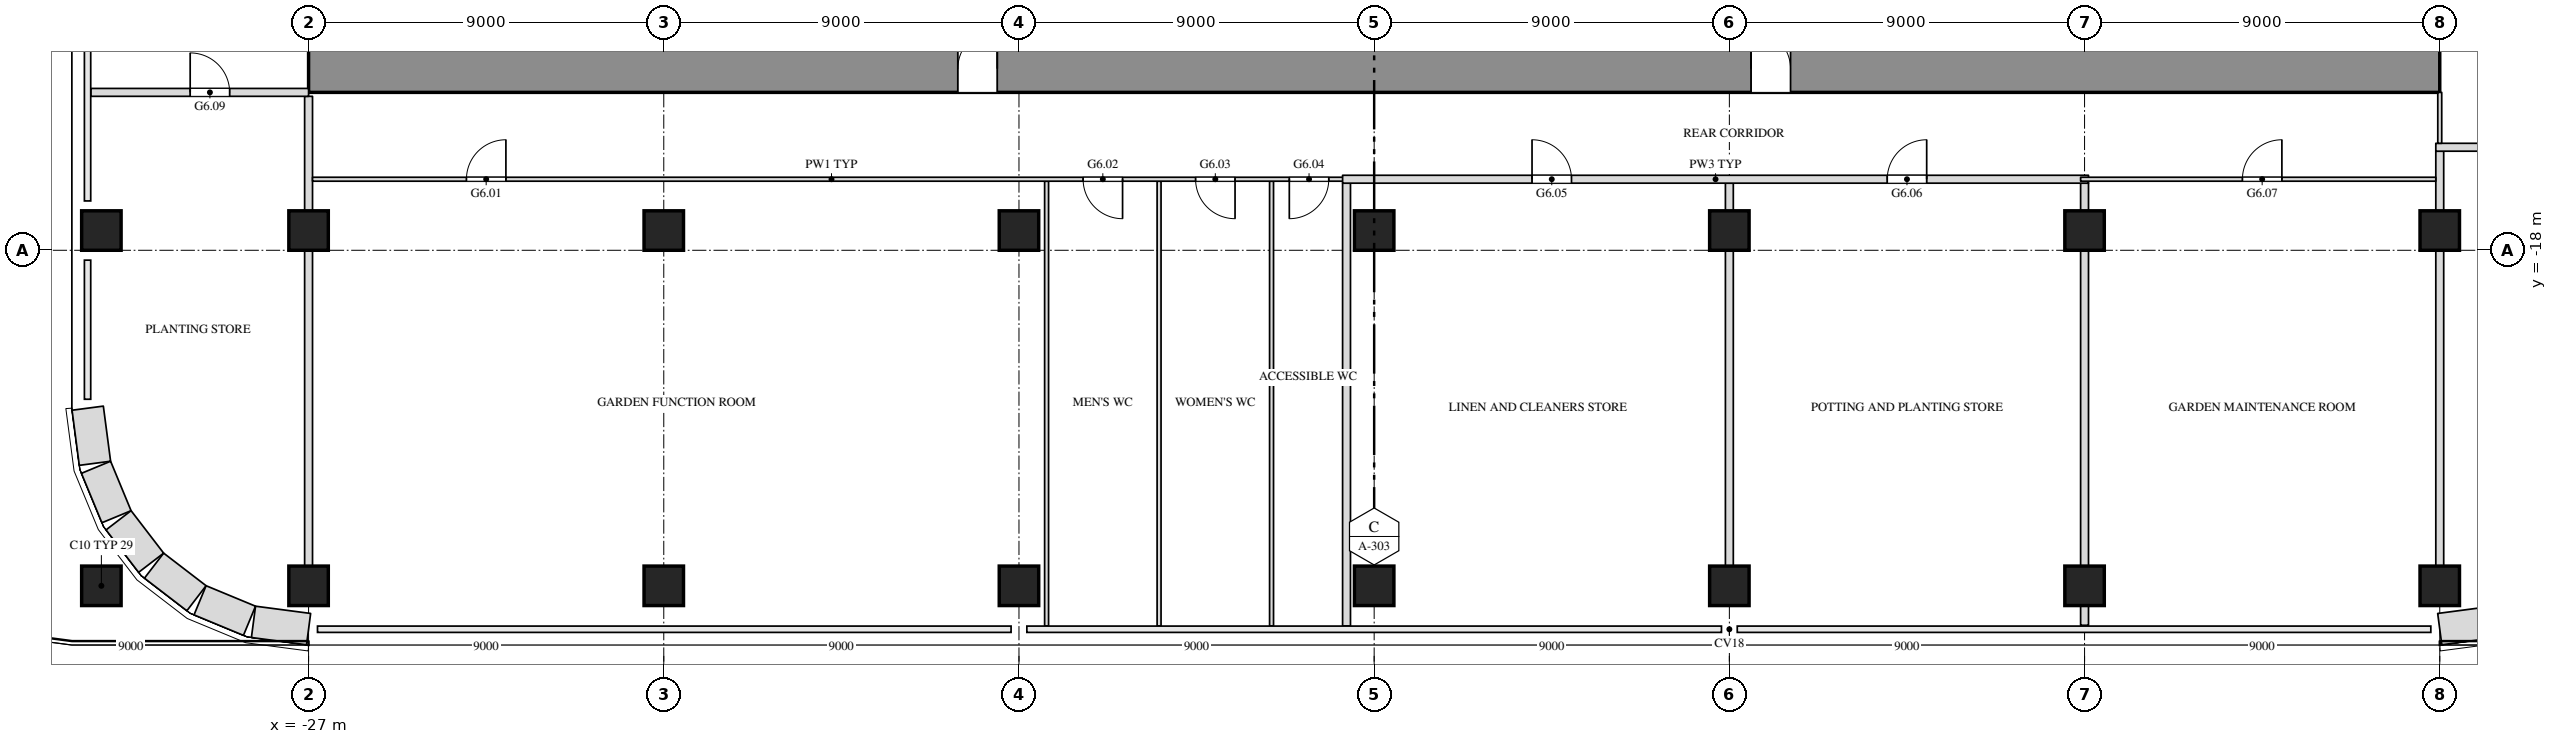
"""IFC4 building model, lengths in metres.
Left out: names, types, materials, properties, quantities, classifications, styles, units other than length and angle.
Written with IfcOpenShell. Run it as: python <this file> out.ifc"""

import sys

from ifc_helpers import new_model, si_unit, direction, frame, frame_2d, origin, origin_2d, place, context, subcontext, project, spatial, rectangle, extrude, element, fill, save


model = new_model("IFC4")
c1 = context("Model", 3, precision=1e-05, world=origin(), true_north=direction((0.0, 1.0)))
c2 = subcontext(c1, "Body", "Model", "MODEL_VIEW")
j1 = project(units=[si_unit("LENGTHUNIT", "METRE"), si_unit("PLANEANGLEUNIT", "RADIAN")], contexts=[c1])
p1 = place(None, origin())
s1 = spatial("IfcSite", under=j1, at=p1, CompositionType="ELEMENT")
p2 = place(p1, origin())
s2 = spatial("IfcBuilding", under=s1, at=p2, CompositionType="ELEMENT")
p3 = place(p2, frame((0.0, 0.0, 39.0)))
s3 = spatial("IfcBuildingStorey", under=s2, at=p3, CompositionType="ELEMENT", Elevation=39.0)
for number, where, z_axis, x_axis in (
    (1, (-32.25, -26.5, 0.0), (0.0, 0.0, 1.0), (1.0, 0.0, 0.0)),
    (2, (-27.0, -26.5, 0.0), (0.0, 0.0, 1.0), (1.0, 0.0, 0.0)),
    (3, (-18.0, -26.5, 0.0), (0.0, 0.0, 1.0), (1.0, 0.0, 0.0)),
    (4, (-9.0, -26.5, 0.0), (0.0, 0.0, 1.0), (1.0, 0.0, 0.0)),
    (5, (0.0, -26.5, 0.0), (0.0, 0.0, 1.0), (1.0, 0.0, 0.0)),
    (6, (9.0, -26.5, 0.0), (0.0, 0.0, 1.0), (1.0, 0.0, 0.0)),
    (7, (18.0, -26.5, 0.0), (0.0, 0.0, 1.0), (1.0, 0.0, 0.0)),
    (8, (27.0, -26.5, 0.0), (0.0, 0.0, 1.0), (1.0, 0.0, 0.0)),
    (9, (-32.25, -17.5, 0.0), (0.0, 0.0, 1.0), (1.0, 0.0, 0.0)),
    (10, (-27.0, -17.5, 0.0), (0.0, 0.0, 1.0), (1.0, 0.0, 0.0)),
    (11, (-18.0, -17.5, 0.0), (0.0, 0.0, 1.0), (1.0, 0.0, 0.0)),
    (12, (-9.0, -17.5, 0.0), (0.0, 0.0, 1.0), (1.0, 0.0, 0.0)),
    (13, (0.0, -17.5, 0.0), (0.0, 0.0, 1.0), (1.0, 0.0, 0.0)),
    (14, (9.0, -17.5, 0.0), (0.0, 0.0, 1.0), (1.0, 0.0, 0.0)),
    (15, (18.0, -17.5, 0.0), (0.0, 0.0, 1.0), (1.0, 0.0, 0.0)),
    (16, (27.0, -17.5, 0.0), (0.0, 0.0, 1.0), (1.0, 0.0, 0.0)),
):
    element("IfcColumn", number, at=place(p3, frame(where, z_axis=z_axis, x_axis=x_axis)), inside=s3, PredefinedType="COLUMN", context=c2, shape_type="SweptSolid", body=[
        extrude(rectangle(XDim=1.0, YDim=1.0, at=origin_2d()), origin(), (0.0, 0.0, 1.0), 4.5),
    ])
p4 = place(p3, frame((-27.0, -13.4, 0.0), z_axis=(0.0, 0.0, 1.0), x_axis=(1.0, 0.0, 0.0)))
e17 = element("IfcWall", 17, at=p4, inside=s3, PredefinedType="SHEAR", context=c2, shape_type="SweptSolid", body=[
    extrude(rectangle(XDim=54.0, YDim=1.2, at=frame_2d((27.0, 0.0))), origin(), (0.0, 0.0, 1.0), 4.25),
])
p5 = place(p4, frame((16.45, 0.0, 0.0)))
e18 = element("IfcOpeningElement", 18, at=p5, cuts=e17, PredefinedType="OPENING", context=c2, shape_type="SweptSolid", body=[
    extrude(rectangle(XDim=1.0, YDim=2.1, at=frame_2d((0.5, 1.05))), frame((0.0, 0.612, 0.0), z_axis=(0.0, -1.0, 0.0), x_axis=(1.0, 0.0, 0.0)), (0.0, 0.0, 1.0), 1.224),
])
p6 = place(p4, frame((36.55, 0.0, 0.0)))
e19 = element("IfcOpeningElement", 19, at=p6, cuts=e17, PredefinedType="OPENING", context=c2, shape_type="SweptSolid", body=[
    extrude(rectangle(XDim=1.0, YDim=2.1, at=frame_2d((0.5, 1.05))), frame((0.0, 0.612, 0.0), z_axis=(0.0, -1.0, 0.0), x_axis=(1.0, 0.0, 0.0)), (0.0, 0.0, 1.0), 1.224),
])
for number, where, z_axis, x_axis in (
    (20, (-8.3, -27.516, 0.0), (0.0, 0.0, 1.0), (0.0, 1.0, 0.0)),
    (21, (-5.45, -27.516, 0.0), (0.0, 0.0, 1.0), (0.0, 1.0, 0.0)),
    (22, (-2.6, -27.516, 0.0), (0.0, 0.0, 1.0), (0.0, 1.0, 0.0)),
):
    element("IfcWall", number, at=place(p3, frame(where, z_axis=z_axis, x_axis=x_axis)), inside=s3, PredefinedType="PARTITIONING", context=c2, shape_type="SweptSolid", body=[
        extrude(rectangle(XDim=11.266, YDim=0.1, at=frame_2d((5.633, 0.0))), origin(), (0.0, 0.0, 1.0), 4.25),
    ])
p7 = place(p3, frame((-0.7, -27.516, 0.0), z_axis=(0.0, 0.0, 1.0), x_axis=(0.0, 1.0, 0.0)))
e23 = element("IfcWall", 23, at=p7, inside=s3, PredefinedType="PARTITIONING", context=c2, shape_type="SweptSolid", body=[
    extrude(rectangle(XDim=11.216, YDim=0.2, at=frame_2d((5.608, 0.0))), origin(), (0.0, 0.0, 1.0), 4.25),
])
p8 = place(p3, frame((18.0, -27.5, 0.0), z_axis=(0.0, 0.0, 1.0), x_axis=(0.0, 1.0, 0.0)))
e24 = element("IfcWall", 24, at=p8, inside=s3, PredefinedType="PARTITIONING", context=c2, shape_type="SweptSolid", body=[
    extrude(rectangle(XDim=0.5, YDim=0.2, at=frame_2d((0.25, 0.0))), origin(), (0.0, 0.0, 1.0), 4.25),
])
p9 = place(p3, frame((18.0, -26.0, 0.0), z_axis=(0.0, 0.0, 1.0), x_axis=(0.0, 1.0, 0.0)))
e25 = element("IfcWall", 25, at=p9, inside=s3, PredefinedType="PARTITIONING", context=c2, shape_type="SweptSolid", body=[
    extrude(rectangle(XDim=8.0, YDim=0.2, at=frame_2d((4.0, 0.0))), origin(), (0.0, 0.0, 1.0), 3.638),
])
p10 = place(p3, frame((18.0, -17.0, 0.0), z_axis=(0.0, 0.0, 1.0), x_axis=(0.0, 1.0, 0.0)))
e26 = element("IfcWall", 26, at=p10, inside=s3, PredefinedType="PARTITIONING", context=c2, shape_type="SweptSolid", body=[
    extrude(rectangle(XDim=0.7, YDim=0.2, at=frame_2d((0.35, 0.0))), origin(), (0.0, 0.0, 1.0), 4.25),
])
p11 = place(p3, frame((9.0, -26.0, 0.0), z_axis=(0.0, 0.0, 1.0), x_axis=(0.0, 1.0, 0.0)))
e27 = element("IfcWall", 27, at=p11, inside=s3, PredefinedType="PARTITIONING", context=c2, shape_type="SweptSolid", body=[
    extrude(rectangle(XDim=8.0, YDim=0.2, at=frame_2d((4.0, 0.0))), origin(), (0.0, 0.0, 1.0), 3.638),
])
p12 = place(p3, frame((9.0, -17.0, 0.0), z_axis=(0.0, 0.0, 1.0), x_axis=(0.0, 1.0, 0.0)))
e28 = element("IfcWall", 28, at=p12, inside=s3, PredefinedType="PARTITIONING", context=c2, shape_type="SweptSolid", body=[
    extrude(rectangle(XDim=0.7, YDim=0.2, at=frame_2d((0.35, 0.0))), origin(), (0.0, 0.0, 1.0), 4.25),
])
p13 = place(p3, frame((-27.0, -26.0, 0.0), z_axis=(0.0, 0.0, 1.0), x_axis=(0.0, 1.0, 0.0)))
e29 = element("IfcWall", 29, at=p13, inside=s3, PredefinedType="PARTITIONING", context=c2, shape_type="SweptSolid", body=[
    extrude(rectangle(XDim=8.0, YDim=0.2, at=frame_2d((4.0, 0.0))), origin(), (0.0, 0.0, 1.0), 3.638),
])
p14 = place(p3, frame((-27.0, -17.0, 0.0), z_axis=(0.0, 0.0, 1.0), x_axis=(0.0, 1.0, 0.0)))
e30 = element("IfcWall", 30, at=p14, inside=s3, PredefinedType="PARTITIONING", context=c2, shape_type="SweptSolid", body=[
    extrude(rectangle(XDim=2.9, YDim=0.2, at=frame_2d((1.45, 0.0))), origin(), (0.0, 0.0, 1.0), 3.638),
])
p15 = place(p3, frame((27.0, -26.0, 0.0), z_axis=(0.0, 0.0, 1.0), x_axis=(0.0, 1.0, 0.0)))
e31 = element("IfcWall", 31, at=p15, inside=s3, PredefinedType="PARTITIONING", context=c2, shape_type="SweptSolid", body=[
    extrude(rectangle(XDim=8.0, YDim=0.2, at=frame_2d((4.0, 0.0))), origin(), (0.0, 0.0, 1.0), 3.638),
])
p16 = place(p3, frame((27.0, -17.0, 0.0), z_axis=(0.0, 0.0, 1.0), x_axis=(0.0, 1.0, 0.0)))
e32 = element("IfcWall", 32, at=p16, inside=s3, PredefinedType="PARTITIONING", context=c2, shape_type="SweptSolid", body=[
    extrude(rectangle(XDim=1.51, YDim=0.2, at=frame_2d((0.755, 0.0))), origin(), (0.0, 0.0, 1.0), 3.638),
])
p17 = place(p3, frame((-26.9, -16.2, 0.0), z_axis=(0.0, 0.0, 1.0), x_axis=(1.0, 0.0, 0.0)))
e33 = element("IfcWall", 33, at=p17, inside=s3, PredefinedType="PARTITIONING", context=c2, shape_type="SweptSolid", body=[
    extrude(rectangle(XDim=26.3, YDim=0.1, at=frame_2d((13.15, 0.0))), origin(), (0.0, 0.0, 1.0), 4.25),
])
p18 = place(p17, frame((3.9, 0.0, 0.0)))
e34 = element("IfcOpeningElement", 34, at=p18, cuts=e33, PredefinedType="OPENING", context=c2, shape_type="SweptSolid", body=[
    extrude(rectangle(XDim=1.0, YDim=2.1, at=frame_2d((0.5, 1.05))), frame((0.0, 0.062, 0.0), z_axis=(0.0, -1.0, 0.0), x_axis=(1.0, 0.0, 0.0)), (0.0, 0.0, 1.0), 0.124),
])
p19 = place(p17, frame((19.525, 0.0, 0.0)))
e35 = element("IfcOpeningElement", 35, at=p19, cuts=e33, PredefinedType="OPENING", context=c2, shape_type="SweptSolid", body=[
    extrude(rectangle(XDim=1.0, YDim=2.1, at=frame_2d((0.5, 1.05))), frame((0.0, 0.062, 0.0), z_axis=(0.0, -1.0, 0.0), x_axis=(1.0, 0.0, 0.0)), (0.0, 0.0, 1.0), 0.124),
])
p20 = place(p17, frame((22.375, 0.0, 0.0)))
e36 = element("IfcOpeningElement", 36, at=p20, cuts=e33, PredefinedType="OPENING", context=c2, shape_type="SweptSolid", body=[
    extrude(rectangle(XDim=1.0, YDim=2.1, at=frame_2d((0.5, 1.05))), frame((0.0, 0.062, 0.0), z_axis=(0.0, -1.0, 0.0), x_axis=(1.0, 0.0, 0.0)), (0.0, 0.0, 1.0), 0.124),
])
p21 = place(p17, frame((24.75, 0.0, 0.0)))
e37 = element("IfcOpeningElement", 37, at=p21, cuts=e33, PredefinedType="OPENING", context=c2, shape_type="SweptSolid", body=[
    extrude(rectangle(XDim=1.0, YDim=2.1, at=frame_2d((0.5, 1.05))), frame((0.0, 0.062, 0.0), z_axis=(0.0, -1.0, 0.0), x_axis=(1.0, 0.0, 0.0)), (0.0, 0.0, 1.0), 0.124),
])
p22 = place(p3, frame((-0.8, -16.2, 0.0), z_axis=(0.0, 0.0, 1.0), x_axis=(1.0, 0.0, 0.0)))
e38 = element("IfcWall", 38, at=p22, inside=s3, PredefinedType="PARTITIONING", context=c2, shape_type="SweptSolid", body=[
    extrude(rectangle(XDim=18.9, YDim=0.2, at=frame_2d((9.45, 0.0))), origin(), (0.0, 0.0, 1.0), 4.25),
])
p23 = place(p22, frame((4.8, 0.0, 0.0)))
e39 = element("IfcOpeningElement", 39, at=p23, cuts=e38, PredefinedType="OPENING", context=c2, shape_type="SweptSolid", body=[
    extrude(rectangle(XDim=1.0, YDim=2.1, at=frame_2d((0.5, 1.05))), frame((0.0, 0.112, 0.0), z_axis=(0.0, -1.0, 0.0), x_axis=(1.0, 0.0, 0.0)), (0.0, 0.0, 1.0), 0.224),
])
p24 = place(p22, frame((13.8, 0.0, 0.0)))
e40 = element("IfcOpeningElement", 40, at=p24, cuts=e38, PredefinedType="OPENING", context=c2, shape_type="SweptSolid", body=[
    extrude(rectangle(XDim=1.0, YDim=2.1, at=frame_2d((0.5, 1.05))), frame((0.0, 0.112, 0.0), z_axis=(0.0, -1.0, 0.0), x_axis=(1.0, 0.0, 0.0)), (0.0, 0.0, 1.0), 0.224),
])
p25 = place(p3, frame((17.9, -16.2, 0.0), z_axis=(0.0, 0.0, 1.0), x_axis=(1.0, 0.0, 0.0)))
e41 = element("IfcWall", 41, at=p25, inside=s3, PredefinedType="PARTITIONING", context=c2, shape_type="SweptSolid", body=[
    extrude(rectangle(XDim=9.0, YDim=0.1, at=frame_2d((4.5, 0.0))), origin(), (0.0, 0.0, 1.0), 4.25),
])
p26 = place(p25, frame((4.1, 0.0, 0.0)))
e42 = element("IfcOpeningElement", 42, at=p26, cuts=e41, PredefinedType="OPENING", context=c2, shape_type="SweptSolid", body=[
    extrude(rectangle(XDim=1.0, YDim=2.1, at=frame_2d((0.5, 1.05))), frame((0.0, 0.062, 0.0), z_axis=(0.0, -1.0, 0.0), x_axis=(1.0, 0.0, 0.0)), (0.0, 0.0, 1.0), 0.124),
])
p27 = place(p3, frame((26.9, -15.39, 0.0), z_axis=(0.0, 0.0, 1.0), x_axis=(1.0, 0.0, 0.0)))
e43 = element("IfcWall", 43, at=p27, inside=s3, PredefinedType="PARTITIONING", context=c2, shape_type="SweptSolid", body=[
    extrude(rectangle(XDim=5.3, YDim=0.2, at=frame_2d((2.65, 0.0))), origin(), (0.0, 0.0, 1.0), 4.25),
])
p28 = place(p27, frame((2.1, 0.0, 0.0)))
e44 = element("IfcOpeningElement", 44, at=p28, cuts=e43, PredefinedType="OPENING", context=c2, shape_type="SweptSolid", body=[
    extrude(rectangle(XDim=1.0, YDim=2.1, at=frame_2d((0.5, 1.05))), frame((0.0, 0.112, 0.0), z_axis=(0.0, -1.0, 0.0), x_axis=(1.0, 0.0, 0.0)), (0.0, 0.0, 1.0), 0.224),
])
p29 = place(p3, frame((27.0, -15.29, 0.0), z_axis=(0.0, 0.0, 1.0), x_axis=(0.0, 1.0, 0.0)))
e45 = element("IfcWall", 45, at=p29, inside=s3, PredefinedType="PARTITIONING", context=c2, shape_type="SweptSolid", body=[
    extrude(rectangle(XDim=1.29, YDim=0.1, at=frame_2d((0.645, 0.0))), origin(), (0.0, 0.0, 1.0), 3.638),
])
p30 = place(p3, frame((-32.516, -14.0, 0.0), z_axis=(0.0, 0.0, 1.0), x_axis=(1.0, 0.0, 0.0)))
e46 = element("IfcWall", 46, at=p30, inside=s3, PredefinedType="PARTITIONING", context=c2, shape_type="SweptSolid", body=[
    extrude(rectangle(XDim=5.516, YDim=0.2, at=frame_2d((2.758, 0.0))), origin(), (0.0, 0.0, 1.0), 4.25),
])
p31 = place(p30, frame((2.516, 0.0, 0.0)))
e47 = element("IfcOpeningElement", 47, at=p31, cuts=e46, PredefinedType="OPENING", context=c2, shape_type="SweptSolid", body=[
    extrude(rectangle(XDim=1.0, YDim=2.1, at=frame_2d((0.5, 1.05))), frame((0.0, 0.112, 0.0), z_axis=(0.0, -1.0, 0.0), x_axis=(1.0, 0.0, 0.0)), (0.0, 0.0, 1.0), 0.224),
])
for number, where, z_axis, x_axis in (
    (48, (27.0, -27.597, 0.0), (0.0, 0.0, 1.0), (0.991, 0.131, 0.0)),
    (49, (-32.597, -22.0, 0.0), (0.0, 0.0, 1.0), (0.131, -0.991, 0.0)),
):
    element("IfcWall", number, at=place(p3, frame(where, z_axis=z_axis, x_axis=x_axis)), inside=s3, PredefinedType="SOLIDWALL", context=c2, shape_type="SweptSolid", body=[
        extrude(rectangle(XDim=1.408, YDim=0.8, at=frame_2d((0.704, 0.0))), origin(), (0.0, 0.0, 1.0), 4.25),
    ])
p32 = place(p3, frame((-32.386, -23.497, 0.0), z_axis=(0.0, 0.0, 1.0), x_axis=(0.38276009378, -0.923847774587, 0.0)))
e50 = element("IfcWall", 50, at=p32, inside=s3, PredefinedType="SOLIDWALL", context=c2, shape_type="SweptSolid", body=[
    extrude(rectangle(XDim=1.355, YDim=0.8, at=frame_2d((0.678, 0.0))), origin(), (0.0, 0.0, 1.0), 4.25),
])
for number, where, z_axis, x_axis in (
    (51, (-31.815, -24.84, 0.0), (0.0, 0.0, 1.0), (0.609, -0.793, 0.0)),
    (52, (-30.916, -25.989, 0.0), (0.0, 0.0, 1.0), (0.793, -0.609, 0.0)),
):
    element("IfcWall", number, at=place(p3, frame(where, z_axis=z_axis, x_axis=x_axis)), inside=s3, PredefinedType="SOLIDWALL", context=c2, shape_type="SweptSolid", body=[
        extrude(rectangle(XDim=1.356, YDim=0.8, at=frame_2d((0.678, 0.0))), origin(), (0.0, 0.0, 1.0), 4.25),
    ])
p33 = place(p3, frame((-29.75, -26.867, 0.0), z_axis=(0.0, 0.0, 1.0), x_axis=(0.923847774587, -0.38276009378, 0.0)))
e53 = element("IfcWall", 53, at=p33, inside=s3, PredefinedType="SOLIDWALL", context=c2, shape_type="SweptSolid", body=[
    extrude(rectangle(XDim=1.355, YDim=0.8, at=frame_2d((0.678, 0.0))), origin(), (0.0, 0.0, 1.0), 4.25),
])
p34 = place(p3, frame((-28.396, -27.413, 0.0), z_axis=(0.0, 0.0, 1.0), x_axis=(0.99144603414, -0.130517283865, 0.0)))
e54 = element("IfcWall", 54, at=p34, inside=s3, PredefinedType="SOLIDWALL", context=c2, shape_type="SweptSolid", body=[
    extrude(rectangle(XDim=1.408, YDim=0.8, at=frame_2d((0.704, 0.0))), origin(), (0.0, 0.0, 1.0), 4.25),
])
p35 = place(p18, origin())
e55 = element("IfcDoor", 55, at=p35, inside=s3, OperationType="SINGLE_SWING_RIGHT", PredefinedType="DOOR", context=c2, shape_type="SweptSolid", body=[
    extrude(rectangle(XDim=1.0, YDim=2.1, at=frame_2d((0.5, 1.05))), frame((0.0, 0.025, 0.0), z_axis=(0.0, -1.0, 0.0), x_axis=(1.0, 0.0, 0.0)), (0.0, 0.0, 1.0), 0.05),
])
fill(e34, e55)
p36 = place(p19, origin())
e56 = element("IfcDoor", 56, at=p36, inside=s3, OperationType="SINGLE_SWING_LEFT", PredefinedType="DOOR", context=c2, shape_type="SweptSolid", body=[
    extrude(rectangle(XDim=1.0, YDim=2.1, at=frame_2d((0.5, 1.05))), frame((0.0, 0.025, 0.0), z_axis=(0.0, -1.0, 0.0), x_axis=(1.0, 0.0, 0.0)), (0.0, 0.0, 1.0), 0.05),
])
fill(e35, e56)
p37 = place(p20, origin())
e57 = element("IfcDoor", 57, at=p37, inside=s3, OperationType="SINGLE_SWING_LEFT", PredefinedType="DOOR", context=c2, shape_type="SweptSolid", body=[
    extrude(rectangle(XDim=1.0, YDim=2.1, at=frame_2d((0.5, 1.05))), frame((0.0, 0.025, 0.0), z_axis=(0.0, -1.0, 0.0), x_axis=(1.0, 0.0, 0.0)), (0.0, 0.0, 1.0), 0.05),
])
fill(e36, e57)
p38 = place(p21, origin())
e58 = element("IfcDoor", 58, at=p38, inside=s3, OperationType="SINGLE_SWING_RIGHT", PredefinedType="DOOR", context=c2, shape_type="SweptSolid", body=[
    extrude(rectangle(XDim=1.0, YDim=2.1, at=frame_2d((0.5, 1.05))), frame((0.0, 0.025, 0.0), z_axis=(0.0, -1.0, 0.0), x_axis=(1.0, 0.0, 0.0)), (0.0, 0.0, 1.0), 0.05),
])
fill(e37, e58)
p39 = place(p23, origin())
e59 = element("IfcDoor", 59, at=p39, inside=s3, OperationType="SINGLE_SWING_LEFT", PredefinedType="DOOR", context=c2, shape_type="SweptSolid", body=[
    extrude(rectangle(XDim=1.0, YDim=2.1, at=frame_2d((0.5, 1.05))), frame((0.0, 0.025, 0.0), z_axis=(0.0, -1.0, 0.0), x_axis=(1.0, 0.0, 0.0)), (0.0, 0.0, 1.0), 0.05),
])
fill(e39, e59)
p40 = place(p24, origin())
e60 = element("IfcDoor", 60, at=p40, inside=s3, OperationType="SINGLE_SWING_RIGHT", PredefinedType="DOOR", context=c2, shape_type="SweptSolid", body=[
    extrude(rectangle(XDim=1.0, YDim=2.1, at=frame_2d((0.5, 1.05))), frame((0.0, 0.025, 0.0), z_axis=(0.0, -1.0, 0.0), x_axis=(1.0, 0.0, 0.0)), (0.0, 0.0, 1.0), 0.05),
])
fill(e40, e60)
p41 = place(p26, origin())
e61 = element("IfcDoor", 61, at=p41, inside=s3, OperationType="SINGLE_SWING_RIGHT", PredefinedType="DOOR", context=c2, shape_type="SweptSolid", body=[
    extrude(rectangle(XDim=1.0, YDim=2.1, at=frame_2d((0.5, 1.05))), frame((0.0, 0.025, 0.0), z_axis=(0.0, -1.0, 0.0), x_axis=(1.0, 0.0, 0.0)), (0.0, 0.0, 1.0), 0.05),
])
fill(e42, e61)
p42 = place(p31, origin())
e62 = element("IfcDoor", 62, at=p42, inside=s3, OperationType="SINGLE_SWING_LEFT", PredefinedType="DOOR", context=c2, shape_type="SweptSolid", body=[
    extrude(rectangle(XDim=1.0, YDim=2.1, at=frame_2d((0.5, 1.05))), frame((0.0, 0.025, 0.0), z_axis=(0.0, -1.0, 0.0), x_axis=(1.0, 0.0, 0.0)), (0.0, 0.0, 1.0), 0.05),
])
fill(e47, e62)
p43 = place(p5, origin())
e63 = element("IfcDoor", 63, at=p43, inside=s3, OperationType="SINGLE_SWING_RIGHT", PredefinedType="DOOR", context=c2, shape_type="SweptSolid", body=[
    extrude(rectangle(XDim=1.0, YDim=2.1, at=frame_2d((0.5, 1.05))), frame((0.0, 0.025, 0.0), z_axis=(0.0, -1.0, 0.0), x_axis=(1.0, 0.0, 0.0)), (0.0, 0.0, 1.0), 0.05),
])
fill(e18, e63)
p44 = place(p6, origin())
e64 = element("IfcDoor", 64, at=p44, inside=s3, OperationType="SINGLE_SWING_LEFT", PredefinedType="DOOR", context=c2, shape_type="SweptSolid", body=[
    extrude(rectangle(XDim=1.0, YDim=2.1, at=frame_2d((0.5, 1.05))), frame((0.0, 0.025, 0.0), z_axis=(0.0, -1.0, 0.0), x_axis=(1.0, 0.0, 0.0)), (0.0, 0.0, 1.0), 0.05),
])
fill(e19, e64)
save(model, sys.argv[1])
